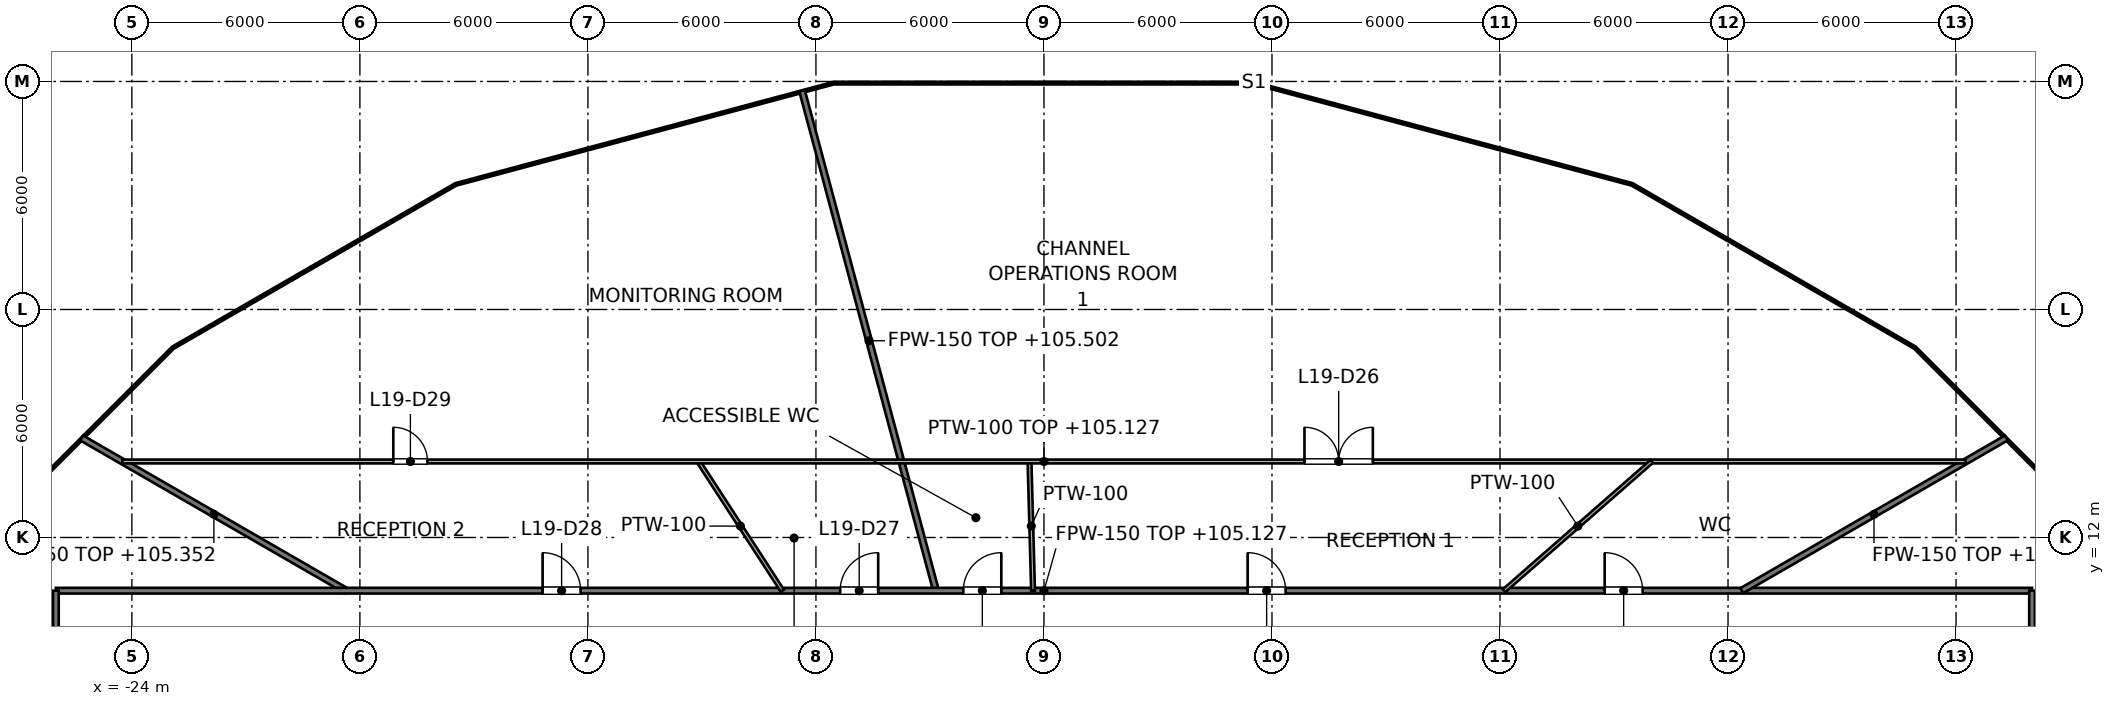
"""IFC4 building model, lengths in metres.
Left out: names, types, materials, properties, quantities, classifications, styles, units other than length and angle.
Written with IfcOpenShell. Run it as: python <this file> out.ifc"""

import sys

from ifc_helpers import new_model, si_unit, direction, frame, frame_2d, origin, place, context, subcontext, project, spatial, rectangle, extrude, element, fill, save


model = new_model("IFC4")
c1 = context("Model", 3, precision=1e-05, world=origin(), true_north=direction((0.0, 1.0)))
c2 = subcontext(c1, "Body", "Model", "MODEL_VIEW")
j1 = project(units=[si_unit("LENGTHUNIT", "METRE"), si_unit("PLANEANGLEUNIT", "RADIAN")], contexts=[c1])
p1 = place(None, origin())
s1 = spatial("IfcSite", under=j1, at=p1, CompositionType="ELEMENT")
p2 = place(p1, origin())
s2 = spatial("IfcBuilding", under=s1, at=p2, CompositionType="ELEMENT")
p3 = place(p2, frame((0.0, 0.0, 102.0)))
s3 = spatial("IfcBuildingStorey", under=s2, at=p3, CompositionType="ELEMENT", Elevation=102.0)
p4 = place(p3, frame((-6.365, 23.754, 0.0), z_axis=(0.0, 0.0, 1.0), x_axis=(0.258843021616, -0.965919401483, 0.0)))
e1 = element("IfcWall", 1, at=p4, inside=s3, PredefinedType="PARTITIONING", context=c2, shape_type="SweptSolid", body=[
    extrude(rectangle(XDim=13.618, YDim=0.15, at=frame_2d((6.809, 0.0))), origin(), (0.0, 0.0, 1.0), 3.502),
])
p5 = place(p3, frame((-25.322, 14.619, 0.0), z_axis=(0.0, 0.0, 1.0), x_axis=(0.866017655369, -0.500013420409, 0.0)))
e2 = element("IfcWall", 2, at=p5, inside=s3, PredefinedType="PARTITIONING", context=c2, shape_type="SweptSolid", body=[
    extrude(rectangle(XDim=8.038, YDim=0.15, at=frame_2d((4.019, 0.0))), origin(), (0.0, 0.0, 1.0), 3.352),
])
p6 = place(p3, frame((-26.0, 10.6, 0.0), z_axis=(0.0, 0.0, 1.0), x_axis=(1.0, 0.0, 0.0)))
e3 = element("IfcWall", 3, at=p6, inside=s3, PredefinedType="PARTITIONING", context=c2, shape_type="SweptSolid", body=[
    extrude(rectangle(XDim=52.0, YDim=0.15, at=frame_2d((26.0, 0.0))), origin(), (0.0, 0.0, 1.0), 3.127),
])
p7 = place(p6, frame((40.753, 0.0, 0.0)))
e4 = element("IfcOpeningElement", 4, at=p7, cuts=e3, PredefinedType="OPENING", context=c2, shape_type="SweptSolid", body=[
    extrude(rectangle(XDim=1.0, YDim=2.1, at=frame_2d((0.5, 1.05))), frame((0.0, 0.075, 0.0), z_axis=(0.0, -1.0, 0.0), x_axis=(1.0, 0.0, 0.0)), (0.0, 0.0, 1.0), 0.15),
])
p8 = place(p6, frame((31.36, 0.0, 0.0)))
e5 = element("IfcOpeningElement", 5, at=p8, cuts=e3, PredefinedType="OPENING", context=c2, shape_type="SweptSolid", body=[
    extrude(rectangle(XDim=1.0, YDim=2.1, at=frame_2d((0.5, 1.05))), frame((0.0, 0.075, 0.0), z_axis=(0.0, -1.0, 0.0), x_axis=(1.0, 0.0, 0.0)), (0.0, 0.0, 1.0), 0.15),
])
p9 = place(p6, frame((23.878, 0.0, 0.0)))
e6 = element("IfcOpeningElement", 6, at=p9, cuts=e3, PredefinedType="OPENING", context=c2, shape_type="SweptSolid", body=[
    extrude(rectangle(XDim=1.0, YDim=2.1, at=frame_2d((0.5, 1.05))), frame((0.0, 0.075, 0.0), z_axis=(0.0, -1.0, 0.0), x_axis=(1.0, 0.0, 0.0)), (0.0, 0.0, 1.0), 0.15),
])
p10 = place(p6, frame((20.638, 0.0, 0.0)))
e7 = element("IfcOpeningElement", 7, at=p10, cuts=e3, PredefinedType="OPENING", context=c2, shape_type="SweptSolid", body=[
    extrude(rectangle(XDim=1.0, YDim=2.1, at=frame_2d((0.5, 1.05))), frame((0.0, 0.075, 0.0), z_axis=(0.0, -1.0, 0.0), x_axis=(1.0, 0.0, 0.0)), (0.0, 0.0, 1.0), 0.15),
])
p11 = place(p6, frame((12.808, 0.0, 0.0)))
e8 = element("IfcOpeningElement", 8, at=p11, cuts=e3, PredefinedType="OPENING", context=c2, shape_type="SweptSolid", body=[
    extrude(rectangle(XDim=1.0, YDim=2.1, at=frame_2d((0.5, 1.05))), frame((0.0, 0.075, 0.0), z_axis=(0.0, -1.0, 0.0), x_axis=(1.0, 0.0, 0.0)), (0.0, 0.0, 1.0), 0.15),
])
p12 = place(p3, frame((18.361, 10.6, 0.0), z_axis=(0.0, 0.0, 1.0), x_axis=(0.866017655369, 0.500013420409, 0.0)))
e9 = element("IfcWall", 9, at=p12, inside=s3, PredefinedType="PARTITIONING", context=c2, shape_type="SweptSolid", body=[
    extrude(rectangle(XDim=8.038, YDim=0.15, at=frame_2d((4.019, 0.0))), origin(), (0.0, 0.0, 1.0), 3.352),
])
for number, where, z_axis, x_axis in (
    (10, (26.0, 7.8, 0.0), (0.0, 0.0, 1.0), (0.0, 1.0, 0.0)),
    (11, (-26.0, 7.8, 0.0), (0.0, 0.0, 1.0), (0.0, 1.0, 0.0)),
):
    element("IfcWall", number, at=place(p3, frame(where, z_axis=z_axis, x_axis=x_axis)), inside=s3, PredefinedType="PARTITIONING", context=c2, shape_type="SweptSolid", body=[
        extrude(rectangle(XDim=2.8, YDim=0.15, at=frame_2d((1.4, 0.0))), origin(), (0.0, 0.0, 1.0), 3.276),
    ])
p13 = place(p3, frame((-0.38, 14.0, 0.0), z_axis=(0.0, 0.0, 1.0), x_axis=(0.027276935786, -0.999627915163, 0.0)))
e12 = element("IfcWall", 12, at=p13, inside=s3, PredefinedType="PARTITIONING", context=c2, shape_type="SweptSolid", body=[
    extrude(rectangle(XDim=3.401, YDim=0.1, at=frame_2d((1.701, 0.0))), origin(), (0.0, 0.0, 1.0), 4.05),
])
p14 = place(p3, frame((-9.092, 14.0, 0.0), z_axis=(0.0, 0.0, 1.0), x_axis=(0.54465385443, -0.838660943918, 0.0)))
e13 = element("IfcWall", 13, at=p14, inside=s3, PredefinedType="PARTITIONING", context=c2, shape_type="SweptSolid", body=[
    extrude(rectangle(XDim=4.054, YDim=0.1, at=frame_2d((2.027, 0.0))), origin(), (0.0, 0.0, 1.0), 4.05),
])
p15 = place(p3, frame((-24.25, 14.0, 0.0), z_axis=(0.0, 0.0, 1.0), x_axis=(1.0, 0.0, 0.0)))
e14 = element("IfcWall", 14, at=p15, inside=s3, PredefinedType="PARTITIONING", context=c2, shape_type="SweptSolid", body=[
    extrude(rectangle(XDim=48.5, YDim=0.1, at=frame_2d((24.25, 0.0))), origin(), (0.0, 0.0, 1.0), 3.127),
])
p16 = place(p15, frame((31.105, 0.0, 0.0)))
e15 = element("IfcOpeningElement", 15, at=p16, cuts=e14, PredefinedType="OPENING", context=c2, shape_type="SweptSolid", body=[
    extrude(rectangle(XDim=1.8, YDim=2.1, at=frame_2d((0.9, 1.05))), frame((0.0, 0.05, 0.0), z_axis=(0.0, -1.0, 0.0), x_axis=(1.0, 0.0, 0.0)), (0.0, 0.0, 1.0), 0.1),
])
p17 = place(p15, frame((7.129, 0.0, 0.0)))
e16 = element("IfcOpeningElement", 16, at=p17, cuts=e14, PredefinedType="OPENING", context=c2, shape_type="SweptSolid", body=[
    extrude(rectangle(XDim=0.9, YDim=2.1, at=frame_2d((0.45, 1.05))), frame((0.0, 0.05, 0.0), z_axis=(0.0, -1.0, 0.0), x_axis=(1.0, 0.0, 0.0)), (0.0, 0.0, 1.0), 0.1),
])
p18 = place(p3, frame((12.107, 10.6, 0.0), z_axis=(0.0, 0.0, 1.0), x_axis=(0.752362742548, 0.658749044497, 0.0)))
e17 = element("IfcWall", 17, at=p18, inside=s3, PredefinedType="PARTITIONING", context=c2, shape_type="SweptSolid", body=[
    extrude(rectangle(XDim=5.161, YDim=0.1, at=frame_2d((2.581, 0.0))), origin(), (0.0, 0.0, 1.0), 4.05),
])
p19 = place(p7, origin())
e18 = element("IfcDoor", 18, at=p19, inside=s3, OperationType="SINGLE_SWING_LEFT", PredefinedType="DOOR", context=c2, shape_type="SweptSolid", body=[
    extrude(rectangle(XDim=1.0, YDim=2.1, at=frame_2d((0.5, 1.05))), frame((0.0, 0.025, 0.0), z_axis=(0.0, -1.0, 0.0), x_axis=(1.0, 0.0, 0.0)), (0.0, 0.0, 1.0), 0.05),
])
fill(e4, e18)
p20 = place(p8, origin())
e19 = element("IfcDoor", 19, at=p20, inside=s3, OperationType="SINGLE_SWING_LEFT", PredefinedType="DOOR", context=c2, shape_type="SweptSolid", body=[
    extrude(rectangle(XDim=1.0, YDim=2.1, at=frame_2d((0.5, 1.05))), frame((0.0, 0.025, 0.0), z_axis=(0.0, -1.0, 0.0), x_axis=(1.0, 0.0, 0.0)), (0.0, 0.0, 1.0), 0.05),
])
fill(e5, e19)
p21 = place(p9, origin())
e20 = element("IfcDoor", 20, at=p21, inside=s3, OperationType="SINGLE_SWING_RIGHT", PredefinedType="DOOR", context=c2, shape_type="SweptSolid", body=[
    extrude(rectangle(XDim=1.0, YDim=2.1, at=frame_2d((0.5, 1.05))), frame((0.0, 0.025, 0.0), z_axis=(0.0, -1.0, 0.0), x_axis=(1.0, 0.0, 0.0)), (0.0, 0.0, 1.0), 0.05),
])
fill(e6, e20)
p22 = place(p16, origin())
e21 = element("IfcDoor", 21, at=p22, inside=s3, OperationType="DOUBLE_DOOR_SINGLE_SWING", PredefinedType="DOOR", context=c2, shape_type="SweptSolid", body=[
    extrude(rectangle(XDim=1.8, YDim=2.1, at=frame_2d((0.9, 1.05))), frame((0.0, 0.025, 0.0), z_axis=(0.0, -1.0, 0.0), x_axis=(1.0, 0.0, 0.0)), (0.0, 0.0, 1.0), 0.05),
])
fill(e15, e21)
p23 = place(p10, origin())
e22 = element("IfcDoor", 22, at=p23, inside=s3, OperationType="SINGLE_SWING_RIGHT", PredefinedType="DOOR", context=c2, shape_type="SweptSolid", body=[
    extrude(rectangle(XDim=1.0, YDim=2.1, at=frame_2d((0.5, 1.05))), frame((0.0, 0.025, 0.0), z_axis=(0.0, -1.0, 0.0), x_axis=(1.0, 0.0, 0.0)), (0.0, 0.0, 1.0), 0.05),
])
fill(e7, e22)
p24 = place(p11, origin())
e23 = element("IfcDoor", 23, at=p24, inside=s3, OperationType="SINGLE_SWING_LEFT", PredefinedType="DOOR", context=c2, shape_type="SweptSolid", body=[
    extrude(rectangle(XDim=1.0, YDim=2.1, at=frame_2d((0.5, 1.05))), frame((0.0, 0.025, 0.0), z_axis=(0.0, -1.0, 0.0), x_axis=(1.0, 0.0, 0.0)), (0.0, 0.0, 1.0), 0.05),
])
fill(e8, e23)
p25 = place(p17, origin())
e24 = element("IfcDoor", 24, at=p25, inside=s3, OperationType="SINGLE_SWING_LEFT", PredefinedType="DOOR", context=c2, shape_type="SweptSolid", body=[
    extrude(rectangle(XDim=0.9, YDim=2.1, at=frame_2d((0.45, 1.05))), frame((0.0, 0.025, 0.0), z_axis=(0.0, -1.0, 0.0), x_axis=(1.0, 0.0, 0.0)), (0.0, 0.0, 1.0), 0.05),
])
fill(e16, e24)
save(model, sys.argv[1])
